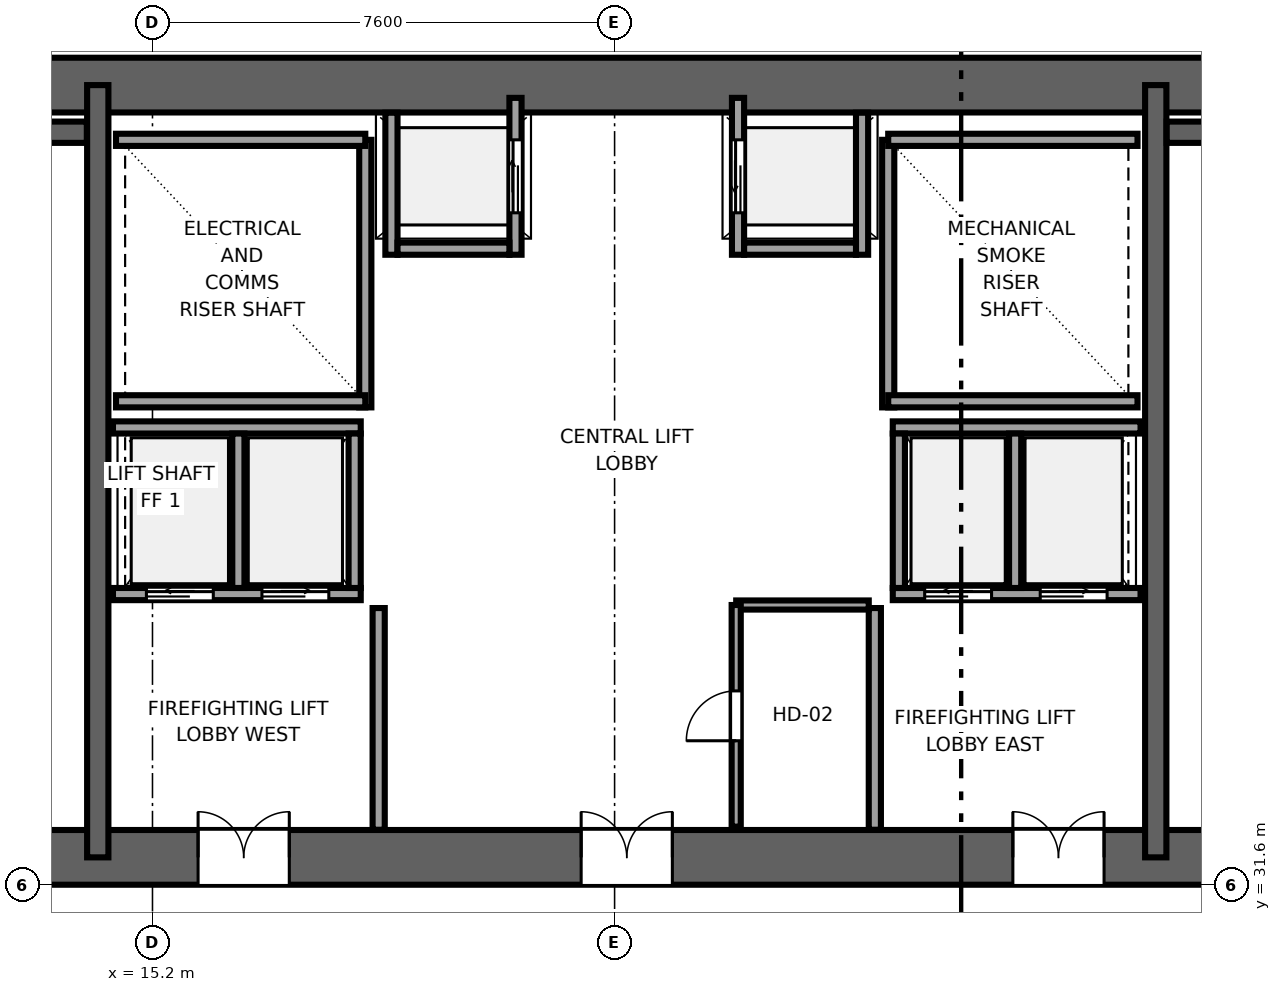
"""IFC4 building model, lengths in metres.
Left out: names, types, materials, properties, quantities, classifications, styles, units other than length and angle.
Written with IfcOpenShell. Run it as: python <this file> out.ifc"""

import sys

from ifc_helpers import new_model, si_unit, direction, frame, frame_2d, origin, place, context, subcontext, project, spatial, rectangle, extrude, source, transform, mapped, element, fill, save


model = new_model("IFC4")
c1 = context("Model", 3, precision=1e-05, world=origin(), true_north=direction((0.0, 1.0)))
c2 = subcontext(c1, "Body", "Model", "MODEL_VIEW")
j1 = project(units=[si_unit("LENGTHUNIT", "METRE"), si_unit("PLANEANGLEUNIT", "RADIAN")], contexts=[c1])
p1 = place(None, origin())
s1 = spatial("IfcSite", under=j1, at=p1, CompositionType="ELEMENT")
p2 = place(p1, origin())
s2 = spatial("IfcBuilding", under=s1, at=p2, CompositionType="ELEMENT")
p3 = place(p2, frame((0.0, 0.0, -4.8)))
s3 = spatial("IfcBuildingStorey", under=s2, at=p3, CompositionType="ELEMENT", Elevation=-4.8)
p4 = place(p3, frame((9.6, 32.05, 0.0), z_axis=(0.0, 0.0, 1.0), x_axis=(1.0, 0.0, 0.0)))
e1 = element("IfcWall", 1, at=p4, inside=s3, PredefinedType="SHEAR", context=c2, shape_type="SweptSolid", body=[
    extrude(rectangle(XDim=26.8, YDim=0.9, at=frame_2d((13.4, 0.0))), origin(), (0.0, 0.0, 1.0), 4.8),
])
p5 = place(p4, frame((7.85, 0.0, 0.0), z_axis=(0.0, 0.0, 1.0), x_axis=(-1.0, 0.0, 0.0)))
e2 = element("IfcOpeningElement", 2, at=p5, cuts=e1, PredefinedType="OPENING", context=c2, shape_type="SweptSolid", body=[
    extrude(rectangle(XDim=1.5, YDim=2.04, at=frame_2d((0.75, 1.02))), frame((0.0, 0.46, 0.0), z_axis=(0.0, -1.0, 0.0), x_axis=(1.0, 0.0, 0.0)), (0.0, 0.0, 1.0), 0.92),
])
p6 = place(p4, frame((14.15, 0.0, 0.0), z_axis=(0.0, 0.0, 1.0), x_axis=(-1.0, 0.0, 0.0)))
e3 = element("IfcOpeningElement", 3, at=p6, cuts=e1, PredefinedType="OPENING", context=c2, shape_type="SweptSolid", body=[
    extrude(rectangle(XDim=1.5, YDim=2.04, at=frame_2d((0.75, 1.02))), frame((0.0, 0.46, 0.0), z_axis=(0.0, -1.0, 0.0), x_axis=(1.0, 0.0, 0.0)), (0.0, 0.0, 1.0), 0.92),
])
p7 = place(p4, frame((21.25, 0.0, 0.0), z_axis=(0.0, 0.0, 1.0), x_axis=(-1.0, 0.0, 0.0)))
e4 = element("IfcOpeningElement", 4, at=p7, cuts=e1, PredefinedType="OPENING", context=c2, shape_type="SweptSolid", body=[
    extrude(rectangle(XDim=1.5, YDim=2.04, at=frame_2d((0.75, 1.02))), frame((0.0, 0.46, 0.0), z_axis=(0.0, -1.0, 0.0), x_axis=(1.0, 0.0, 0.0)), (0.0, 0.0, 1.0), 0.92),
])
p8 = place(p3, frame((9.6, 44.75, 0.0), z_axis=(0.0, 0.0, 1.0), x_axis=(1.0, 0.0, 0.0)))
e5 = element("IfcWall", 5, at=p8, inside=s3, PredefinedType="SHEAR", context=c2, shape_type="SweptSolid", body=[
    extrude(rectangle(XDim=26.8, YDim=0.9, at=frame_2d((13.4, 0.0))), origin(), (0.0, 0.0, 1.0), 4.8),
])
for number, where, z_axis, x_axis in (
    (6, (14.3, 32.05, 0.0), (0.0, 0.0, 1.0), (0.0, 1.0, 0.0)),
    (7, (31.7, 32.05, 0.0), (0.0, 0.0, 1.0), (0.0, 1.0, 0.0)),
):
    element("IfcWall", number, at=place(p3, frame(where, z_axis=z_axis, x_axis=x_axis)), inside=s3, PredefinedType="SHEAR", context=c2, shape_type="SweptSolid", body=[
        extrude(rectangle(XDim=12.7, YDim=0.35, at=frame_2d((6.35, 0.0))), origin(), (0.0, 0.0, 1.0), 4.8),
    ])
for number, where, z_axis, x_axis in (
    (8, (10.52, 43.975, 0.0), (0.0, 0.0, 1.0), (1.0, 0.0, 0.0)),
    (9, (31.88, 43.975, 0.0), (0.0, 0.0, 1.0), (1.0, 0.0, 0.0)),
):
    element("IfcWall", number, at=place(p3, frame(where, z_axis=z_axis, x_axis=x_axis)), inside=s3, PredefinedType="SHEAR", context=c2, shape_type="SweptSolid", body=[
        extrude(rectangle(XDim=3.6, YDim=0.35, at=frame_2d((1.8, 0.0))), origin(), (0.0, 0.0, 1.0), 4.8),
    ])
p9 = place(p3, frame((18.7, 39.45, 0.0), z_axis=(0.0, 0.0, 1.0), x_axis=(0.0, 1.0, 0.0)))
e10 = element("IfcWall", 10, at=p9, inside=s3, PredefinedType="SOLIDWALL", context=c2, shape_type="SweptSolid", body=[
    extrude(rectangle(XDim=4.4, YDim=0.2, at=frame_2d((2.2, 0.0))), origin(), (0.0, 0.0, 1.0), 4.54),
])
for number, where, z_axis, x_axis in (
    (11, (14.6, 39.55, 0.0), (0.0, 0.0, 1.0), (1.0, 0.0, 0.0)),
    (12, (14.6, 43.85, 0.0), (0.0, 0.0, 1.0), (1.0, 0.0, 0.0)),
):
    element("IfcWall", number, at=place(p3, frame(where, z_axis=z_axis, x_axis=x_axis)), inside=s3, PredefinedType="SOLIDWALL", context=c2, shape_type="SweptSolid", body=[
        extrude(rectangle(XDim=4.1, YDim=0.2, at=frame_2d((2.05, 0.0))), origin(), (0.0, 0.0, 1.0), 4.54),
    ])
p10 = place(p3, frame((27.3, 39.45, 0.0), z_axis=(0.0, 0.0, 1.0), x_axis=(0.0, 1.0, 0.0)))
e13 = element("IfcWall", 13, at=p10, inside=s3, PredefinedType="SOLIDWALL", context=c2, shape_type="SweptSolid", body=[
    extrude(rectangle(XDim=4.4, YDim=0.2, at=frame_2d((2.2, 0.0))), origin(), (0.0, 0.0, 1.0), 4.54),
])
for number, where, z_axis, x_axis in (
    (14, (27.3, 39.55, 0.0), (0.0, 0.0, 1.0), (1.0, 0.0, 0.0)),
    (15, (27.3, 43.85, 0.0), (0.0, 0.0, 1.0), (1.0, 0.0, 0.0)),
):
    element("IfcWall", number, at=place(p3, frame(where, z_axis=z_axis, x_axis=x_axis)), inside=s3, PredefinedType="SOLIDWALL", context=c2, shape_type="SweptSolid", body=[
        extrude(rectangle(XDim=4.1, YDim=0.2, at=frame_2d((2.05, 0.0))), origin(), (0.0, 0.0, 1.0), 4.54),
    ])
for number, where, z_axis, x_axis in (
    (16, (18.92, 32.504, 0.0), (0.0, 0.0, 1.0), (0.0, 1.0, 0.0)),
    (17, (27.08, 32.504, 0.0), (0.0, 0.0, 1.0), (0.0, 1.0, 0.0)),
):
    element("IfcWall", number, at=place(p3, frame(where, z_axis=z_axis, x_axis=x_axis)), inside=s3, PredefinedType="SOLIDWALL", context=c2, shape_type="SweptSolid", body=[
        extrude(rectangle(XDim=3.646, YDim=0.2, at=frame_2d((1.823, 0.0))), origin(), (0.0, 0.0, 1.0), 4.54),
    ])
p11 = place(p3, frame((21.17, 41.96, 0.0), z_axis=(0.0, 0.0, 1.0), x_axis=(0.0, 1.0, 0.0)))
e18 = element("IfcWall", 18, at=p11, inside=s3, PredefinedType="SOLIDWALL", context=c2, shape_type="SweptSolid", body=[
    extrude(rectangle(XDim=2.58, YDim=0.2, at=frame_2d((1.29, 0.0))), origin(), (0.0, 0.0, 1.0), 4.54),
])
p12 = place(p11, frame((0.69, 0.0, 0.0)))
e19 = element("IfcOpeningElement", 19, at=p12, cuts=e18, PredefinedType="OPENING", context=c2, shape_type="SweptSolid", body=[
    extrude(rectangle(XDim=1.2, YDim=2.15, at=frame_2d((0.6, 1.075))), frame((0.0, 0.11, 0.0), z_axis=(0.0, -1.0, 0.0), x_axis=(1.0, 0.0, 0.0)), (0.0, 0.0, 1.0), 0.22),
])
p13 = place(p3, frame((19.13, 41.96, 0.0), z_axis=(0.0, 0.0, 1.0), x_axis=(0.0, 1.0, 0.0)))
e20 = element("IfcWall", 20, at=p13, inside=s3, PredefinedType="SOLIDWALL", context=c2, shape_type="SweptSolid", body=[
    extrude(rectangle(XDim=2.336, YDim=0.2, at=frame_2d((1.168, 0.0))), origin(), (0.0, 0.0, 1.0), 4.54),
])
p14 = place(p3, frame((19.23, 42.06, 0.0), z_axis=(0.0, 0.0, 1.0), x_axis=(1.0, 0.0, 0.0)))
e21 = element("IfcWall", 21, at=p14, inside=s3, PredefinedType="SOLIDWALL", context=c2, shape_type="SweptSolid", body=[
    extrude(rectangle(XDim=1.84, YDim=0.2, at=frame_2d((0.92, 0.0))), origin(), (0.0, 0.0, 1.0), 4.54),
])
p15 = place(p3, frame((27.375, 36.38, 0.0), z_axis=(0.0, 0.0, 1.0), x_axis=(1.0, 0.0, 0.0)))
e22 = element("IfcWall", 22, at=p15, inside=s3, PredefinedType="SOLIDWALL", context=c2, shape_type="SweptSolid", body=[
    extrude(rectangle(XDim=4.075, YDim=0.2, at=frame_2d((2.038, 0.0))), origin(), (0.0, 0.0, 1.0), 4.54),
])
p16 = place(p15, frame((0.525, 0.0, 0.0)))
e23 = element("IfcOpeningElement", 23, at=p16, cuts=e22, PredefinedType="OPENING", context=c2, shape_type="SweptSolid", body=[
    extrude(rectangle(XDim=1.1, YDim=2.12, at=frame_2d((0.55, 1.06))), frame((0.0, 0.11, 0.0), z_axis=(0.0, -1.0, 0.0), x_axis=(1.0, 0.0, 0.0)), (0.0, 0.0, 1.0), 0.22),
])
p17 = place(p15, frame((2.425, 0.0, 0.0)))
e24 = element("IfcOpeningElement", 24, at=p17, cuts=e22, PredefinedType="OPENING", context=c2, shape_type="SweptSolid", body=[
    extrude(rectangle(XDim=1.1, YDim=2.12, at=frame_2d((0.55, 1.06))), frame((0.0, 0.11, 0.0), z_axis=(0.0, -1.0, 0.0), x_axis=(1.0, 0.0, 0.0)), (0.0, 0.0, 1.0), 0.22),
])
p18 = place(p3, frame((27.375, 39.12, 0.0), z_axis=(0.0, 0.0, 1.0), x_axis=(1.0, 0.0, 0.0)))
e25 = element("IfcWall", 25, at=p18, inside=s3, PredefinedType="SOLIDWALL", context=c2, shape_type="SweptSolid", body=[
    extrude(rectangle(XDim=4.075, YDim=0.2, at=frame_2d((2.038, 0.0))), origin(), (0.0, 0.0, 1.0), 4.54),
])
for number, where, z_axis, x_axis in (
    (26, (27.475, 36.48, 0.0), (0.0, 0.0, 1.0), (0.0, 1.0, 0.0)),
    (27, (29.387, 36.48, 0.0), (0.0, 0.0, 1.0), (0.0, 1.0, 0.0)),
):
    element("IfcWall", number, at=place(p3, frame(where, z_axis=z_axis, x_axis=x_axis)), inside=s3, PredefinedType="SOLIDWALL", context=c2, shape_type="SweptSolid", body=[
        extrude(rectangle(XDim=2.54, YDim=0.2, at=frame_2d((1.27, 0.0))), origin(), (0.0, 0.0, 1.0), 4.54),
    ])
p19 = place(p3, frame((14.55, 36.38, 0.0), z_axis=(0.0, 0.0, 1.0), x_axis=(1.0, 0.0, 0.0)))
e28 = element("IfcWall", 28, at=p19, inside=s3, PredefinedType="SOLIDWALL", context=c2, shape_type="SweptSolid", body=[
    extrude(rectangle(XDim=4.075, YDim=0.2, at=frame_2d((2.038, 0.0))), origin(), (0.0, 0.0, 1.0), 4.54),
])
p20 = place(p19, frame((0.55, 0.0, 0.0)))
e29 = element("IfcOpeningElement", 29, at=p20, cuts=e28, PredefinedType="OPENING", context=c2, shape_type="SweptSolid", body=[
    extrude(rectangle(XDim=1.1, YDim=2.12, at=frame_2d((0.55, 1.06))), frame((0.0, 0.11, 0.0), z_axis=(0.0, -1.0, 0.0), x_axis=(1.0, 0.0, 0.0)), (0.0, 0.0, 1.0), 0.22),
])
p21 = place(p19, frame((2.45, 0.0, 0.0)))
e30 = element("IfcOpeningElement", 30, at=p21, cuts=e28, PredefinedType="OPENING", context=c2, shape_type="SweptSolid", body=[
    extrude(rectangle(XDim=1.1, YDim=2.12, at=frame_2d((0.55, 1.06))), frame((0.0, 0.11, 0.0), z_axis=(0.0, -1.0, 0.0), x_axis=(1.0, 0.0, 0.0)), (0.0, 0.0, 1.0), 0.22),
])
p22 = place(p3, frame((14.55, 39.12, 0.0), z_axis=(0.0, 0.0, 1.0), x_axis=(1.0, 0.0, 0.0)))
e31 = element("IfcWall", 31, at=p22, inside=s3, PredefinedType="SOLIDWALL", context=c2, shape_type="SweptSolid", body=[
    extrude(rectangle(XDim=4.075, YDim=0.2, at=frame_2d((2.038, 0.0))), origin(), (0.0, 0.0, 1.0), 4.54),
])
for number, where, z_axis, x_axis in (
    (32, (18.525, 36.48, 0.0), (0.0, 0.0, 1.0), (0.0, 1.0, 0.0)),
    (33, (16.613, 36.48, 0.0), (0.0, 0.0, 1.0), (0.0, 1.0, 0.0)),
):
    element("IfcWall", number, at=place(p3, frame(where, z_axis=z_axis, x_axis=x_axis)), inside=s3, PredefinedType="SOLIDWALL", context=c2, shape_type="SweptSolid", body=[
        extrude(rectangle(XDim=2.54, YDim=0.2, at=frame_2d((1.27, 0.0))), origin(), (0.0, 0.0, 1.0), 4.54),
    ])
p23 = place(p3, frame((24.83, 41.96, 0.0), z_axis=(0.0, 0.0, 1.0), x_axis=(0.0, 1.0, 0.0)))
e34 = element("IfcWall", 34, at=p23, inside=s3, PredefinedType="SOLIDWALL", context=c2, shape_type="SweptSolid", body=[
    extrude(rectangle(XDim=2.58, YDim=0.2, at=frame_2d((1.29, 0.0))), origin(), (0.0, 0.0, 1.0), 4.54),
])
p24 = place(p23, frame((0.69, 0.0, 0.0)))
e35 = element("IfcOpeningElement", 35, at=p24, cuts=e34, PredefinedType="OPENING", context=c2, shape_type="SweptSolid", body=[
    extrude(rectangle(XDim=1.2, YDim=2.15, at=frame_2d((0.6, 1.075))), frame((0.0, 0.11, 0.0), z_axis=(0.0, -1.0, 0.0), x_axis=(1.0, 0.0, 0.0)), (0.0, 0.0, 1.0), 0.22),
])
p25 = place(p3, frame((26.87, 41.96, 0.0), z_axis=(0.0, 0.0, 1.0), x_axis=(0.0, 1.0, 0.0)))
e36 = element("IfcWall", 36, at=p25, inside=s3, PredefinedType="SOLIDWALL", context=c2, shape_type="SweptSolid", body=[
    extrude(rectangle(XDim=2.336, YDim=0.2, at=frame_2d((1.168, 0.0))), origin(), (0.0, 0.0, 1.0), 4.54),
])
p26 = place(p3, frame((24.93, 42.06, 0.0), z_axis=(0.0, 0.0, 1.0), x_axis=(1.0, 0.0, 0.0)))
e37 = element("IfcWall", 37, at=p26, inside=s3, PredefinedType="SOLIDWALL", context=c2, shape_type="SweptSolid", body=[
    extrude(rectangle(XDim=1.84, YDim=0.2, at=frame_2d((0.92, 0.0))), origin(), (0.0, 0.0, 1.0), 4.54),
])
p27 = place(p3, frame((24.8, 36.2, 0.0), z_axis=(0.0, 0.0, 1.0), x_axis=(1.0, 0.0, 0.0)))
e38 = element("IfcWall", 38, at=p27, inside=s3, PredefinedType="PARTITIONING", context=c2, shape_type="SweptSolid", body=[
    extrude(rectangle(XDim=2.18, YDim=0.15, at=frame_2d((1.09, 0.0))), origin(), (0.0, 0.0, 1.0), 4.54),
])
p28 = place(p3, frame((24.8, 32.555, 0.0), z_axis=(0.0, 0.0, 1.0), x_axis=(0.0, 1.0, 0.0)))
e39 = element("IfcWall", 39, at=p28, inside=s3, PredefinedType="PARTITIONING", context=c2, shape_type="SweptSolid", body=[
    extrude(rectangle(XDim=3.645, YDim=0.15, at=frame_2d((1.823, 0.0))), origin(), (0.0, 0.0, 1.0), 4.54),
])
p29 = place(p28, frame((1.413, 0.0, 0.0)))
e40 = element("IfcOpeningElement", 40, at=p29, cuts=e39, PredefinedType="OPENING", context=c2, shape_type="SweptSolid", body=[
    extrude(rectangle(XDim=0.82, YDim=2.01, at=frame_2d((0.41, 1.005))), frame((0.0, 0.085, 0.0), z_axis=(0.0, -1.0, 0.0), x_axis=(1.0, 0.0, 0.0)), (0.0, 0.0, 1.0), 0.17),
])
m1 = source(origin(), c2, "Body", "SweptSolid", [
    extrude(rectangle(XDim=1.5, YDim=2.04, at=frame_2d((0.75, 1.02))), frame((0.0, 0.025, 0.0), z_axis=(0.0, -1.0, 0.0), x_axis=(1.0, 0.0, 0.0)), (0.0, 0.0, 1.0), 0.05),
])
p30 = place(p5, origin())
e41 = element("IfcDoor", 41, at=p30, inside=s3, OperationType="DOUBLE_DOOR_SINGLE_SWING", PredefinedType="DOOR", context=c2, shape_type="MappedRepresentation", body=[
    mapped(m1, transform((0.0, 0.0, 0.0), x_axis=(1.0, 0.0, 0.0), y_axis=(0.0, 1.0, 0.0), z_axis=(0.0, 0.0, 1.0), scale=1.0)),
])
fill(e2, e41)
p31 = place(p6, origin())
e42 = element("IfcDoor", 42, at=p31, inside=s3, OperationType="DOUBLE_DOOR_SINGLE_SWING", PredefinedType="DOOR", context=c2, shape_type="MappedRepresentation", body=[
    mapped(m1, transform((0.0, 0.0, 0.0), x_axis=(1.0, 0.0, 0.0), y_axis=(0.0, 1.0, 0.0), z_axis=(0.0, 0.0, 1.0), scale=1.0)),
])
fill(e3, e42)
p32 = place(p7, origin())
e43 = element("IfcDoor", 43, at=p32, inside=s3, OperationType="DOUBLE_DOOR_SINGLE_SWING", PredefinedType="DOOR", context=c2, shape_type="MappedRepresentation", body=[
    mapped(m1, transform((0.0, 0.0, 0.0), x_axis=(1.0, 0.0, 0.0), y_axis=(0.0, 1.0, 0.0), z_axis=(0.0, 0.0, 1.0), scale=1.0)),
])
fill(e4, e43)
m2 = source(origin(), c2, "Body", "SweptSolid", [
    extrude(rectangle(XDim=1.2, YDim=2.15, at=frame_2d((0.6, 1.075))), frame((0.0, 0.025, 0.0), z_axis=(0.0, -1.0, 0.0), x_axis=(1.0, 0.0, 0.0)), (0.0, 0.0, 1.0), 0.05),
])
p33 = place(p12, origin())
e44 = element("IfcDoor", 44, at=p33, inside=s3, OperationType="SLIDING_TO_RIGHT", PredefinedType="DOOR", context=c2, shape_type="MappedRepresentation", body=[
    mapped(m2, transform((0.0, 0.0, 0.0), x_axis=(1.0, 0.0, 0.0), y_axis=(0.0, 1.0, 0.0), z_axis=(0.0, 0.0, 1.0), scale=1.0)),
])
fill(e19, e44)
m3 = source(origin(), c2, "Body", "SweptSolid", [
    extrude(rectangle(XDim=1.1, YDim=2.12, at=frame_2d((0.55, 1.06))), frame((0.0, 0.025, 0.0), z_axis=(0.0, -1.0, 0.0), x_axis=(1.0, 0.0, 0.0)), (0.0, 0.0, 1.0), 0.05),
])
p34 = place(p16, origin())
e45 = element("IfcDoor", 45, at=p34, inside=s3, OperationType="SLIDING_TO_LEFT", PredefinedType="DOOR", context=c2, shape_type="MappedRepresentation", body=[
    mapped(m3, transform((0.0, 0.0, 0.0), x_axis=(1.0, 0.0, 0.0), y_axis=(0.0, 1.0, 0.0), z_axis=(0.0, 0.0, 1.0), scale=1.0)),
])
fill(e23, e45)
p35 = place(p17, origin())
e46 = element("IfcDoor", 46, at=p35, inside=s3, OperationType="SLIDING_TO_RIGHT", PredefinedType="DOOR", context=c2, shape_type="MappedRepresentation", body=[
    mapped(m3, transform((0.0, 0.0, 0.0), x_axis=(1.0, 0.0, 0.0), y_axis=(0.0, 1.0, 0.0), z_axis=(0.0, 0.0, 1.0), scale=1.0)),
])
fill(e24, e46)
p36 = place(p20, origin())
e47 = element("IfcDoor", 47, at=p36, inside=s3, OperationType="SLIDING_TO_LEFT", PredefinedType="DOOR", context=c2, shape_type="MappedRepresentation", body=[
    mapped(m3, transform((0.0, 0.0, 0.0), x_axis=(1.0, 0.0, 0.0), y_axis=(0.0, 1.0, 0.0), z_axis=(0.0, 0.0, 1.0), scale=1.0)),
])
fill(e29, e47)
p37 = place(p21, origin())
e48 = element("IfcDoor", 48, at=p37, inside=s3, OperationType="SLIDING_TO_RIGHT", PredefinedType="DOOR", context=c2, shape_type="MappedRepresentation", body=[
    mapped(m3, transform((0.0, 0.0, 0.0), x_axis=(1.0, 0.0, 0.0), y_axis=(0.0, 1.0, 0.0), z_axis=(0.0, 0.0, 1.0), scale=1.0)),
])
fill(e30, e48)
p38 = place(p24, origin())
e49 = element("IfcDoor", 49, at=p38, inside=s3, OperationType="SLIDING_TO_LEFT", PredefinedType="DOOR", context=c2, shape_type="MappedRepresentation", body=[
    mapped(m2, transform((0.0, 0.0, 0.0), x_axis=(1.0, 0.0, 0.0), y_axis=(0.0, 1.0, 0.0), z_axis=(0.0, 0.0, 1.0), scale=1.0)),
])
fill(e35, e49)
m4 = source(origin(), c2, "Body", "SweptSolid", [
    extrude(rectangle(XDim=0.82, YDim=2.01, at=frame_2d((0.41, 1.005))), frame((0.0, 0.025, 0.0), z_axis=(0.0, -1.0, 0.0), x_axis=(1.0, 0.0, 0.0)), (0.0, 0.0, 1.0), 0.05),
])
p39 = place(p29, origin())
e50 = element("IfcDoor", 50, at=p39, inside=s3, OperationType="SINGLE_SWING_LEFT", PredefinedType="DOOR", context=c2, shape_type="MappedRepresentation", body=[
    mapped(m4, transform((0.0, 0.0, 0.0), x_axis=(1.0, 0.0, 0.0), y_axis=(0.0, 1.0, 0.0), z_axis=(0.0, 0.0, 1.0), scale=1.0)),
])
fill(e40, e50)
save(model, sys.argv[1])
